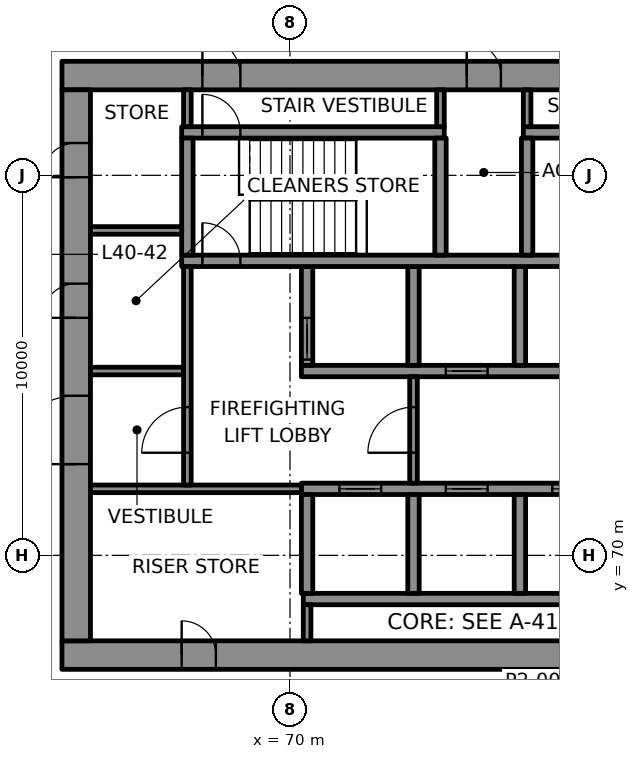
"""IFC4 building model, lengths in metres.
Left out: names, types, materials, properties, quantities, classifications, styles, units other than length and angle.
Written with IfcOpenShell. Run it as: python <this file> out.ifc"""

import sys

from ifc_helpers import new_model, si_unit, direction, frame, frame_2d, origin, place, context, subcontext, project, spatial, rectangle, extrude, element, fill, save


model = new_model("IFC4")
c1 = context("Model", 3, precision=1e-05, world=origin(), true_north=direction((0.0, 1.0)))
c2 = subcontext(c1, "Body", "Model", "MODEL_VIEW")
j1 = project(units=[si_unit("LENGTHUNIT", "METRE"), si_unit("PLANEANGLEUNIT", "RADIAN")], contexts=[c1])
p1 = place(None, origin())
s1 = spatial("IfcSite", under=j1, at=p1, CompositionType="ELEMENT")
p2 = place(p1, origin())
s2 = spatial("IfcBuilding", under=s1, at=p2, CompositionType="ELEMENT")
p3 = place(p2, frame((0.0, 0.0, 175.3)))
s3 = spatial("IfcBuildingStorey", under=s2, at=p3, CompositionType="ELEMENT", Elevation=175.3)
p4 = place(p3, frame((64.0, 67.375, 0.0), z_axis=(0.0, 0.0, 1.0), x_axis=(1.0, 0.0, 0.0)))
e1 = element("IfcWall", 1, at=p4, inside=s3, PredefinedType="SHEAR", context=c2, shape_type="SweptSolid", body=[
    extrude(rectangle(XDim=22.0, YDim=0.75, at=frame_2d((11.0, 0.0))), origin(), (0.0, 0.0, 1.0), 3.7),
])
p5 = place(p4, frame((3.15, 0.0, 0.0)))
e2 = element("IfcOpeningElement", 2, at=p5, cuts=e1, PredefinedType="OPENING", context=c2, shape_type="SweptSolid", body=[
    extrude(rectangle(XDim=0.9, YDim=2.1, at=frame_2d((0.45, 1.05))), frame((0.0, 0.385, 0.0), z_axis=(0.0, -1.0, 0.0), x_axis=(1.0, 0.0, 0.0)), (0.0, 0.0, 1.0), 0.77),
])
p6 = place(p3, frame((64.0, 82.625, 0.0), z_axis=(0.0, 0.0, 1.0), x_axis=(1.0, 0.0, 0.0)))
e3 = element("IfcWall", 3, at=p6, inside=s3, PredefinedType="SHEAR", context=c2, shape_type="SweptSolid", body=[
    extrude(rectangle(XDim=22.0, YDim=0.75, at=frame_2d((11.0, 0.0))), origin(), (0.0, 0.0, 1.0), 3.7),
])
p7 = place(p6, frame((3.695, 0.0, 0.0)))
e4 = element("IfcOpeningElement", 4, at=p7, cuts=e3, PredefinedType="OPENING", context=c2, shape_type="SweptSolid", body=[
    extrude(rectangle(XDim=1.0, YDim=2.1, at=frame_2d((0.5, 1.05))), frame((0.0, 0.385, 0.0), z_axis=(0.0, -1.0, 0.0), x_axis=(1.0, 0.0, 0.0)), (0.0, 0.0, 1.0), 0.77),
])
p8 = place(p6, frame((17.505, 0.0, 0.0)))
e5 = element("IfcOpeningElement", 5, at=p8, cuts=e3, PredefinedType="OPENING", context=c2, shape_type="SweptSolid", body=[
    extrude(rectangle(XDim=1.0, YDim=2.1, at=frame_2d((0.5, 1.05))), frame((0.0, 0.385, 0.0), z_axis=(0.0, -1.0, 0.0), x_axis=(1.0, 0.0, 0.0)), (0.0, 0.0, 1.0), 0.77),
])
p9 = place(p6, frame((10.65, 0.0, 0.0)))
e6 = element("IfcOpeningElement", 6, at=p9, cuts=e3, PredefinedType="OPENING", context=c2, shape_type="SweptSolid", body=[
    extrude(rectangle(XDim=0.9, YDim=2.1, at=frame_2d((0.45, 1.05))), frame((0.0, 0.385, 0.0), z_axis=(0.0, -1.0, 0.0), x_axis=(1.0, 0.0, 0.0)), (0.0, 0.0, 1.0), 0.77),
])
p10 = place(p3, frame((64.375, 67.75, 0.0), z_axis=(0.0, 0.0, 1.0), x_axis=(0.0, 1.0, 0.0)))
e7 = element("IfcWall", 7, at=p10, inside=s3, PredefinedType="SHEAR", context=c2, shape_type="SweptSolid", body=[
    extrude(rectangle(XDim=14.5, YDim=0.75, at=frame_2d((7.25, 0.0))), origin(), (0.0, 0.0, 1.0), 3.7),
])
p11 = place(p10, frame((4.65, 0.0, 0.0)))
e8 = element("IfcOpeningElement", 8, at=p11, cuts=e7, PredefinedType="OPENING", context=c2, shape_type="SweptSolid", body=[
    extrude(rectangle(XDim=1.8, YDim=2.1, at=frame_2d((0.9, 1.05))), frame((0.0, 0.385, 0.0), z_axis=(0.0, -1.0, 0.0), x_axis=(1.0, 0.0, 0.0)), (0.0, 0.0, 1.0), 0.77),
])
p12 = place(p10, frame((8.5, 0.0, 0.0)))
e9 = element("IfcOpeningElement", 9, at=p12, cuts=e7, PredefinedType="OPENING", context=c2, shape_type="SweptSolid", body=[
    extrude(rectangle(XDim=0.9, YDim=2.1, at=frame_2d((0.45, 1.05))), frame((0.0, 0.385, 0.0), z_axis=(0.0, -1.0, 0.0), x_axis=(1.0, 0.0, 0.0)), (0.0, 0.0, 1.0), 0.77),
])
p13 = place(p10, frame((12.2, 0.0, 0.0)))
e10 = element("IfcOpeningElement", 10, at=p13, cuts=e7, PredefinedType="OPENING", context=c2, shape_type="SweptSolid", body=[
    extrude(rectangle(XDim=0.9, YDim=2.1, at=frame_2d((0.45, 1.05))), frame((0.0, 0.385, 0.0), z_axis=(0.0, -1.0, 0.0), x_axis=(1.0, 0.0, 0.0)), (0.0, 0.0, 1.0), 0.77),
])
p14 = place(p3, frame((70.35, 68.85, 0.0), z_axis=(0.0, 0.0, 1.0), x_axis=(1.0, 0.0, 0.0)))
e11 = element("IfcWall", 11, at=p14, inside=s3, PredefinedType="SHEAR", context=c2, shape_type="SweptSolid", body=[
    extrude(rectangle(XDim=14.2, YDim=0.3, at=frame_2d((7.1, 0.0))), origin(), (0.0, 0.0, 1.0), 3.7),
])
p15 = place(p3, frame((70.3, 71.75, 0.0), z_axis=(0.0, 0.0, 1.0), x_axis=(1.0, 0.0, 0.0)))
e12 = element("IfcWall", 12, at=p15, inside=s3, PredefinedType="SHEAR", context=c2, shape_type="SweptSolid", body=[
    extrude(rectangle(XDim=14.3, YDim=0.3, at=frame_2d((7.15, 0.0))), origin(), (0.0, 0.0, 1.0), 3.7),
])
p16 = place(p15, frame((1.0, 0.0, 0.0)))
e13 = element("IfcOpeningElement", 13, at=p16, cuts=e12, PredefinedType="OPENING", context=c2, shape_type="SweptSolid", body=[
    extrude(rectangle(XDim=1.1, YDim=2.1, at=frame_2d((0.55, 1.05))), frame((0.0, 0.16, 0.0), z_axis=(0.0, -1.0, 0.0), x_axis=(1.0, 0.0, 0.0)), (0.0, 0.0, 1.0), 0.32),
])
p17 = place(p15, frame((3.8, 0.0, 0.0)))
e14 = element("IfcOpeningElement", 14, at=p17, cuts=e12, PredefinedType="OPENING", context=c2, shape_type="SweptSolid", body=[
    extrude(rectangle(XDim=1.1, YDim=2.1, at=frame_2d((0.55, 1.05))), frame((0.0, 0.16, 0.0), z_axis=(0.0, -1.0, 0.0), x_axis=(1.0, 0.0, 0.0)), (0.0, 0.0, 1.0), 0.32),
])
p18 = place(p15, frame((6.6, 0.0, 0.0)))
e15 = element("IfcOpeningElement", 15, at=p18, cuts=e12, PredefinedType="OPENING", context=c2, shape_type="SweptSolid", body=[
    extrude(rectangle(XDim=1.1, YDim=2.1, at=frame_2d((0.55, 1.05))), frame((0.0, 0.16, 0.0), z_axis=(0.0, -1.0, 0.0), x_axis=(1.0, 0.0, 0.0)), (0.0, 0.0, 1.0), 0.32),
])
p19 = place(p15, frame((9.4, 0.0, 0.0)))
e16 = element("IfcOpeningElement", 16, at=p19, cuts=e12, PredefinedType="OPENING", context=c2, shape_type="SweptSolid", body=[
    extrude(rectangle(XDim=1.1, YDim=2.1, at=frame_2d((0.55, 1.05))), frame((0.0, 0.16, 0.0), z_axis=(0.0, -1.0, 0.0), x_axis=(1.0, 0.0, 0.0)), (0.0, 0.0, 1.0), 0.32),
])
p20 = place(p15, frame((12.2, 0.0, 0.0)))
e17 = element("IfcOpeningElement", 17, at=p20, cuts=e12, PredefinedType="OPENING", context=c2, shape_type="SweptSolid", body=[
    extrude(rectangle(XDim=1.1, YDim=2.1, at=frame_2d((0.55, 1.05))), frame((0.0, 0.16, 0.0), z_axis=(0.0, -1.0, 0.0), x_axis=(1.0, 0.0, 0.0)), (0.0, 0.0, 1.0), 0.32),
])
p21 = place(p3, frame((70.3, 74.85, 0.0), z_axis=(0.0, 0.0, 1.0), x_axis=(1.0, 0.0, 0.0)))
e18 = element("IfcWall", 18, at=p21, inside=s3, PredefinedType="SHEAR", context=c2, shape_type="SweptSolid", body=[
    extrude(rectangle(XDim=14.3, YDim=0.3, at=frame_2d((7.15, 0.0))), origin(), (0.0, 0.0, 1.0), 3.7),
])
p22 = place(p21, frame((3.8, 0.0, 0.0)))
e19 = element("IfcOpeningElement", 19, at=p22, cuts=e18, PredefinedType="OPENING", context=c2, shape_type="SweptSolid", body=[
    extrude(rectangle(XDim=1.1, YDim=2.1, at=frame_2d((0.55, 1.05))), frame((0.0, 0.16, 0.0), z_axis=(0.0, -1.0, 0.0), x_axis=(1.0, 0.0, 0.0)), (0.0, 0.0, 1.0), 0.32),
])
p23 = place(p21, frame((12.2, 0.0, 0.0)))
e20 = element("IfcOpeningElement", 20, at=p23, cuts=e18, PredefinedType="OPENING", context=c2, shape_type="SweptSolid", body=[
    extrude(rectangle(XDim=1.1, YDim=2.1, at=frame_2d((0.55, 1.05))), frame((0.0, 0.16, 0.0), z_axis=(0.0, -1.0, 0.0), x_axis=(1.0, 0.0, 0.0)), (0.0, 0.0, 1.0), 0.32),
])
p24 = place(p3, frame((70.45, 69.0, 0.0), z_axis=(0.0, 0.0, 1.0), x_axis=(0.0, 1.0, 0.0)))
e21 = element("IfcWall", 21, at=p24, inside=s3, PredefinedType="SHEAR", context=c2, shape_type="SweptSolid", body=[
    extrude(rectangle(XDim=2.6, YDim=0.3, at=frame_2d((1.3, 0.0))), origin(), (0.0, 0.0, 1.0), 3.7),
])
p25 = place(p3, frame((70.45, 75.0, 0.0), z_axis=(0.0, 0.0, 1.0), x_axis=(0.0, 1.0, 0.0)))
e22 = element("IfcWall", 22, at=p25, inside=s3, PredefinedType="SHEAR", context=c2, shape_type="SweptSolid", body=[
    extrude(rectangle(XDim=2.6, YDim=0.3, at=frame_2d((1.3, 0.0))), origin(), (0.0, 0.0, 1.0), 3.7),
])
p26 = place(p25, frame((0.15, 0.0, 0.0)))
e23 = element("IfcOpeningElement", 23, at=p26, cuts=e22, PredefinedType="OPENING", context=c2, shape_type="SweptSolid", body=[
    extrude(rectangle(XDim=1.1, YDim=2.1, at=frame_2d((0.55, 1.05))), frame((0.0, 0.16, 0.0), z_axis=(0.0, -1.0, 0.0), x_axis=(1.0, 0.0, 0.0)), (0.0, 0.0, 1.0), 0.32),
])
for number, where, z_axis, x_axis in (
    (24, (73.25, 69.0, 0.0), (0.0, 0.0, 1.0), (0.0, 1.0, 0.0)),
    (25, (73.25, 75.0, 0.0), (0.0, 0.0, 1.0), (0.0, 1.0, 0.0)),
    (26, (76.05, 69.0, 0.0), (0.0, 0.0, 1.0), (0.0, 1.0, 0.0)),
    (27, (76.05, 75.0, 0.0), (0.0, 0.0, 1.0), (0.0, 1.0, 0.0)),
):
    element("IfcWall", number, at=place(p3, frame(where, z_axis=z_axis, x_axis=x_axis)), inside=s3, PredefinedType="SHEAR", context=c2, shape_type="SweptSolid", body=[
        extrude(rectangle(XDim=2.6, YDim=0.3, at=frame_2d((1.3, 0.0))), origin(), (0.0, 0.0, 1.0), 3.7),
    ])
p27 = place(p3, frame((67.15, 77.75, 0.0), z_axis=(0.0, 0.0, 1.0), x_axis=(1.0, 0.0, 0.0)))
e28 = element("IfcWall", 28, at=p27, inside=s3, PredefinedType="SHEAR", context=c2, shape_type="SweptSolid", body=[
    extrude(rectangle(XDim=17.45, YDim=0.3, at=frame_2d((8.725, 0.0))), origin(), (0.0, 0.0, 1.0), 3.7),
])
p28 = place(p27, frame((0.545, 0.0, 0.0)))
e29 = element("IfcOpeningElement", 29, at=p28, cuts=e28, PredefinedType="OPENING", context=c2, shape_type="SweptSolid", body=[
    extrude(rectangle(XDim=1.0, YDim=2.1, at=frame_2d((0.5, 1.05))), frame((0.0, 0.16, 0.0), z_axis=(0.0, -1.0, 0.0), x_axis=(1.0, 0.0, 0.0)), (0.0, 0.0, 1.0), 0.32),
])
p29 = place(p3, frame((67.15, 81.13, 0.0), z_axis=(0.0, 0.0, 1.0), x_axis=(1.0, 0.0, 0.0)))
e30 = element("IfcWall", 30, at=p29, inside=s3, PredefinedType="SHEAR", context=c2, shape_type="SweptSolid", body=[
    extrude(rectangle(XDim=6.91, YDim=0.3, at=frame_2d((3.455, 0.0))), origin(), (0.0, 0.0, 1.0), 3.7),
])
p30 = place(p29, frame((0.545, 0.0, 0.0)))
e31 = element("IfcOpeningElement", 31, at=p30, cuts=e30, PredefinedType="OPENING", context=c2, shape_type="SweptSolid", body=[
    extrude(rectangle(XDim=1.0, YDim=2.1, at=frame_2d((0.5, 1.05))), frame((0.0, 0.16, 0.0), z_axis=(0.0, -1.0, 0.0), x_axis=(1.0, 0.0, 0.0)), (0.0, 0.0, 1.0), 0.32),
])
p31 = place(p3, frame((76.14, 81.13, 0.0), z_axis=(0.0, 0.0, 1.0), x_axis=(1.0, 0.0, 0.0)))
e32 = element("IfcWall", 32, at=p31, inside=s3, PredefinedType="SHEAR", context=c2, shape_type="SweptSolid", body=[
    extrude(rectangle(XDim=6.86, YDim=0.3, at=frame_2d((3.43, 0.0))), origin(), (0.0, 0.0, 1.0), 3.7),
])
p32 = place(p31, frame((5.365, 0.0, 0.0)))
e33 = element("IfcOpeningElement", 33, at=p32, cuts=e32, PredefinedType="OPENING", context=c2, shape_type="SweptSolid", body=[
    extrude(rectangle(XDim=1.0, YDim=2.1, at=frame_2d((0.5, 1.05))), frame((0.0, 0.16, 0.0), z_axis=(0.0, -1.0, 0.0), x_axis=(1.0, 0.0, 0.0)), (0.0, 0.0, 1.0), 0.32),
])
for number, where, z_axis, x_axis in (
    (34, (67.3, 77.9, 0.0), (0.0, 0.0, 1.0), (0.0, 1.0, 0.0)),
    (35, (73.96, 77.9, 0.0), (0.0, 0.0, 1.0), (0.0, 1.0, 0.0)),
    (36, (76.24, 77.9, 0.0), (0.0, 0.0, 1.0), (0.0, 1.0, 0.0)),
):
    element("IfcWall", number, at=place(p3, frame(where, z_axis=z_axis, x_axis=x_axis)), inside=s3, PredefinedType="SHEAR", context=c2, shape_type="SweptSolid", body=[
        extrude(rectangle(XDim=3.08, YDim=0.3, at=frame_2d((1.54, 0.0))), origin(), (0.0, 0.0, 1.0), 3.7),
    ])
p33 = place(p3, frame((64.75, 71.75, 0.0), z_axis=(0.0, 0.0, 1.0), x_axis=(1.0, 0.0, 0.0)))
e37 = element("IfcWall", 37, at=p33, inside=s3, PredefinedType="PARTITIONING", context=c2, shape_type="SweptSolid", body=[
    extrude(rectangle(XDim=5.55, YDim=0.2, at=frame_2d((2.775, 0.0))), origin(), (0.0, 0.0, 1.0), 3.7),
])
p34 = place(p3, frame((64.75, 74.85, 0.0), z_axis=(0.0, 0.0, 1.0), x_axis=(1.0, 0.0, 0.0)))
e38 = element("IfcWall", 38, at=p34, inside=s3, PredefinedType="PARTITIONING", context=c2, shape_type="SweptSolid", body=[
    extrude(rectangle(XDim=2.45, YDim=0.2, at=frame_2d((1.225, 0.0))), origin(), (0.0, 0.0, 1.0), 3.7),
])
p35 = place(p3, frame((64.75, 78.55, 0.0), z_axis=(0.0, 0.0, 1.0), x_axis=(1.0, 0.0, 0.0)))
e39 = element("IfcWall", 39, at=p35, inside=s3, PredefinedType="PARTITIONING", context=c2, shape_type="SweptSolid", body=[
    extrude(rectangle(XDim=2.4, YDim=0.2, at=frame_2d((1.2, 0.0))), origin(), (0.0, 0.0, 1.0), 3.7),
])
p36 = place(p3, frame((67.3, 71.85, 0.0), z_axis=(0.0, 0.0, 1.0), x_axis=(0.0, 1.0, 0.0)))
e40 = element("IfcWall", 40, at=p36, inside=s3, PredefinedType="PARTITIONING", context=c2, shape_type="SweptSolid", body=[
    extrude(rectangle(XDim=5.75, YDim=0.2, at=frame_2d((2.875, 0.0))), origin(), (0.0, 0.0, 1.0), 3.7),
])
p37 = place(p36, frame((0.85, 0.0, 0.0)))
e41 = element("IfcOpeningElement", 41, at=p37, cuts=e40, PredefinedType="OPENING", context=c2, shape_type="SweptSolid", body=[
    extrude(rectangle(XDim=1.2, YDim=2.1, at=frame_2d((0.6, 1.05))), frame((0.0, 0.11, 0.0), z_axis=(0.0, -1.0, 0.0), x_axis=(1.0, 0.0, 0.0)), (0.0, 0.0, 1.0), 0.22),
])
p38 = place(p3, frame((67.3, 81.28, 0.0), z_axis=(0.0, 0.0, 1.0), x_axis=(0.0, 1.0, 0.0)))
e42 = element("IfcWall", 42, at=p38, inside=s3, PredefinedType="PARTITIONING", context=c2, shape_type="SweptSolid", body=[
    extrude(rectangle(XDim=0.97, YDim=0.2, at=frame_2d((0.485, 0.0))), origin(), (0.0, 0.0, 1.0), 3.7),
])
p39 = place(p3, frame((70.45, 67.75, 0.0), z_axis=(0.0, 0.0, 1.0), x_axis=(0.0, 1.0, 0.0)))
e43 = element("IfcWall", 43, at=p39, inside=s3, PredefinedType="PARTITIONING", context=c2, shape_type="SweptSolid", body=[
    extrude(rectangle(XDim=0.95, YDim=0.2, at=frame_2d((0.475, 0.0))), origin(), (0.0, 0.0, 1.0), 3.7),
])
p40 = place(p3, frame((73.25, 71.9, 0.0), z_axis=(0.0, 0.0, 1.0), x_axis=(0.0, 1.0, 0.0)))
e44 = element("IfcWall", 44, at=p40, inside=s3, PredefinedType="PARTITIONING", context=c2, shape_type="SweptSolid", body=[
    extrude(rectangle(XDim=2.8, YDim=0.2, at=frame_2d((1.4, 0.0))), origin(), (0.0, 0.0, 1.0), 3.7),
])
p41 = place(p40, frame((0.8, 0.0, 0.0)))
e45 = element("IfcOpeningElement", 45, at=p41, cuts=e44, PredefinedType="OPENING", context=c2, shape_type="SweptSolid", body=[
    extrude(rectangle(XDim=1.2, YDim=2.1, at=frame_2d((0.6, 1.05))), frame((0.0, 0.11, 0.0), z_axis=(0.0, -1.0, 0.0), x_axis=(1.0, 0.0, 0.0)), (0.0, 0.0, 1.0), 0.22),
])
for number, where, z_axis, x_axis in (
    (46, (73.96, 81.28, 0.0), (0.0, 0.0, 1.0), (0.0, 1.0, 0.0)),
    (47, (76.24, 81.28, 0.0), (0.0, 0.0, 1.0), (0.0, 1.0, 0.0)),
):
    element("IfcWall", number, at=place(p3, frame(where, z_axis=z_axis, x_axis=x_axis)), inside=s3, PredefinedType="PARTITIONING", context=c2, shape_type="SweptSolid", body=[
        extrude(rectangle(XDim=0.97, YDim=0.2, at=frame_2d((0.485, 0.0))), origin(), (0.0, 0.0, 1.0), 3.7),
    ])
p42 = place(p16, origin())
e48 = element("IfcDoor", 48, at=p42, inside=s3, OperationType="DOUBLE_DOOR_SLIDING", PredefinedType="DOOR", context=c2, shape_type="SweptSolid", body=[
    extrude(rectangle(XDim=1.1, YDim=2.1, at=frame_2d((0.55, 1.05))), frame((0.0, 0.025, 0.0), z_axis=(0.0, -1.0, 0.0), x_axis=(1.0, 0.0, 0.0)), (0.0, 0.0, 1.0), 0.05),
])
fill(e13, e48)
p43 = place(p17, origin())
e49 = element("IfcDoor", 49, at=p43, inside=s3, OperationType="DOUBLE_DOOR_SLIDING", PredefinedType="DOOR", context=c2, shape_type="SweptSolid", body=[
    extrude(rectangle(XDim=1.1, YDim=2.1, at=frame_2d((0.55, 1.05))), frame((0.0, 0.025, 0.0), z_axis=(0.0, -1.0, 0.0), x_axis=(1.0, 0.0, 0.0)), (0.0, 0.0, 1.0), 0.05),
])
fill(e14, e49)
p44 = place(p18, origin())
e50 = element("IfcDoor", 50, at=p44, inside=s3, OperationType="DOUBLE_DOOR_SLIDING", PredefinedType="DOOR", context=c2, shape_type="SweptSolid", body=[
    extrude(rectangle(XDim=1.1, YDim=2.1, at=frame_2d((0.55, 1.05))), frame((0.0, 0.025, 0.0), z_axis=(0.0, -1.0, 0.0), x_axis=(1.0, 0.0, 0.0)), (0.0, 0.0, 1.0), 0.05),
])
fill(e15, e50)
p45 = place(p26, origin())
e51 = element("IfcDoor", 51, at=p45, inside=s3, OperationType="DOUBLE_DOOR_SLIDING", PredefinedType="DOOR", context=c2, shape_type="SweptSolid", body=[
    extrude(rectangle(XDim=1.1, YDim=2.1, at=frame_2d((0.55, 1.05))), frame((0.0, 0.025, 0.0), z_axis=(0.0, -1.0, 0.0), x_axis=(1.0, 0.0, 0.0)), (0.0, 0.0, 1.0), 0.05),
])
fill(e23, e51)
p46 = place(p22, origin())
e52 = element("IfcDoor", 52, at=p46, inside=s3, OperationType="DOUBLE_DOOR_SLIDING", PredefinedType="DOOR", context=c2, shape_type="SweptSolid", body=[
    extrude(rectangle(XDim=1.1, YDim=2.1, at=frame_2d((0.55, 1.05))), frame((0.0, 0.025, 0.0), z_axis=(0.0, -1.0, 0.0), x_axis=(1.0, 0.0, 0.0)), (0.0, 0.0, 1.0), 0.05),
])
fill(e19, e52)
p47 = place(p28, origin())
e53 = element("IfcDoor", 53, at=p47, inside=s3, OperationType="SINGLE_SWING_LEFT", PredefinedType="DOOR", context=c2, shape_type="SweptSolid", body=[
    extrude(rectangle(XDim=1.0, YDim=2.1, at=frame_2d((0.5, 1.05))), frame((0.0, 0.025, 0.0), z_axis=(0.0, -1.0, 0.0), x_axis=(1.0, 0.0, 0.0)), (0.0, 0.0, 1.0), 0.05),
])
fill(e29, e53)
p48 = place(p30, origin())
e54 = element("IfcDoor", 54, at=p48, inside=s3, OperationType="SINGLE_SWING_RIGHT", PredefinedType="DOOR", context=c2, shape_type="SweptSolid", body=[
    extrude(rectangle(XDim=1.0, YDim=2.1, at=frame_2d((0.5, 1.05))), frame((0.0, 0.025, 0.0), z_axis=(0.0, -1.0, 0.0), x_axis=(1.0, 0.0, 0.0)), (0.0, 0.0, 1.0), 0.05),
])
fill(e31, e54)
p49 = place(p7, origin())
e55 = element("IfcDoor", 55, at=p49, inside=s3, OperationType="SINGLE_SWING_LEFT", PredefinedType="DOOR", context=c2, shape_type="SweptSolid", body=[
    extrude(rectangle(XDim=1.0, YDim=2.1, at=frame_2d((0.5, 1.05))), frame((0.0, 0.095, 0.0), z_axis=(0.0, -1.0, 0.0), x_axis=(1.0, 0.0, 0.0)), (0.0, 0.0, 1.0), 0.19),
])
fill(e4, e55)
p50 = place(p41, origin())
e56 = element("IfcDoor", 56, at=p50, inside=s3, OperationType="SINGLE_SWING_LEFT", PredefinedType="DOOR", context=c2, shape_type="SweptSolid", body=[
    extrude(rectangle(XDim=1.2, YDim=2.1, at=frame_2d((0.6, 1.05))), frame((0.0, 0.025, 0.0), z_axis=(0.0, -1.0, 0.0), x_axis=(1.0, 0.0, 0.0)), (0.0, 0.0, 1.0), 0.05),
])
fill(e45, e56)
p51 = place(p37, origin())
e57 = element("IfcDoor", 57, at=p51, inside=s3, OperationType="SINGLE_SWING_RIGHT", PredefinedType="DOOR", context=c2, shape_type="SweptSolid", body=[
    extrude(rectangle(XDim=1.2, YDim=2.1, at=frame_2d((0.6, 1.05))), frame((0.0, 0.025, 0.0), z_axis=(0.0, -1.0, 0.0), x_axis=(1.0, 0.0, 0.0)), (0.0, 0.0, 1.0), 0.05),
])
fill(e41, e57)
p52 = place(p11, origin())
e58 = element("IfcDoor", 58, at=p52, inside=s3, OperationType="SINGLE_SWING_LEFT", PredefinedType="DOOR", context=c2, shape_type="SweptSolid", body=[
    extrude(rectangle(XDim=1.8, YDim=2.1, at=frame_2d((0.9, 1.05))), frame((0.0, 0.095, 0.0), z_axis=(0.0, -1.0, 0.0), x_axis=(1.0, 0.0, 0.0)), (0.0, 0.0, 1.0), 0.19),
])
fill(e8, e58)
p53 = place(p5, origin())
e59 = element("IfcDoor", 59, at=p53, inside=s3, OperationType="SINGLE_SWING_LEFT", PredefinedType="DOOR", context=c2, shape_type="SweptSolid", body=[
    extrude(rectangle(XDim=0.9, YDim=2.1, at=frame_2d((0.45, 1.05))), frame((0.0, 0.095, 0.0), z_axis=(0.0, -1.0, 0.0), x_axis=(1.0, 0.0, 0.0)), (0.0, 0.0, 1.0), 0.19),
])
fill(e2, e59)
p54 = place(p12, origin())
e60 = element("IfcDoor", 60, at=p54, inside=s3, OperationType="SINGLE_SWING_RIGHT", PredefinedType="DOOR", context=c2, shape_type="SweptSolid", body=[
    extrude(rectangle(XDim=0.9, YDim=2.1, at=frame_2d((0.45, 1.05))), frame((0.0, 0.095, 0.0), z_axis=(0.0, -1.0, 0.0), x_axis=(1.0, 0.0, 0.0)), (0.0, 0.0, 1.0), 0.19),
])
fill(e9, e60)
p55 = place(p13, origin())
e61 = element("IfcDoor", 61, at=p55, inside=s3, OperationType="SINGLE_SWING_LEFT", PredefinedType="DOOR", context=c2, shape_type="SweptSolid", body=[
    extrude(rectangle(XDim=0.9, YDim=2.1, at=frame_2d((0.45, 1.05))), frame((0.0, 0.095, 0.0), z_axis=(0.0, -1.0, 0.0), x_axis=(1.0, 0.0, 0.0)), (0.0, 0.0, 1.0), 0.19),
])
fill(e10, e61)
p56 = place(p9, origin())
e62 = element("IfcDoor", 62, at=p56, inside=s3, OperationType="SINGLE_SWING_RIGHT", PredefinedType="DOOR", context=c2, shape_type="SweptSolid", body=[
    extrude(rectangle(XDim=0.9, YDim=2.1, at=frame_2d((0.45, 1.05))), frame((0.0, 0.095, 0.0), z_axis=(0.0, -1.0, 0.0), x_axis=(1.0, 0.0, 0.0)), (0.0, 0.0, 1.0), 0.19),
])
fill(e6, e62)
save(model, sys.argv[1])
